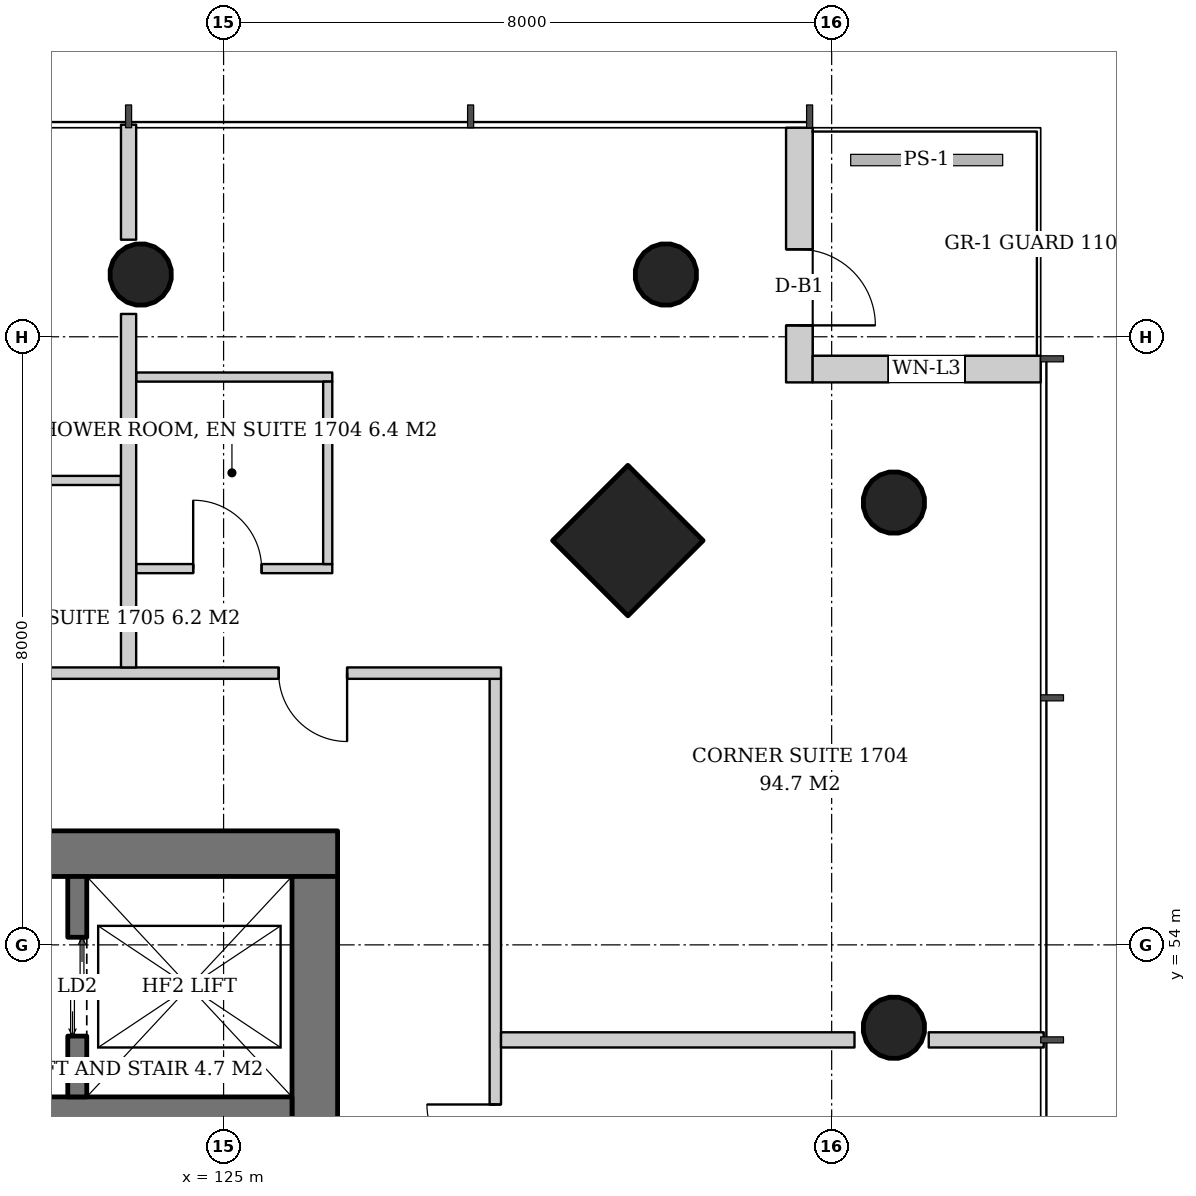
"""IFC4 building model, lengths in metres.
Left out: names, types, materials, properties, quantities, classifications, styles, units other than length and angle.
Written with IfcOpenShell. Run it as: python <this file> out.ifc"""

import sys

from ifc_helpers import new_model, si_unit, direction, frame, frame_2d, origin, origin_2d, place, context, subcontext, project, spatial, rectangle, hollow_circle, extrude, element, fill, save


model = new_model("IFC4")
c1 = context("Model", 3, precision=1e-05, world=origin(), true_north=direction((0.0, 1.0)))
c2 = subcontext(c1, "Body", "Model", "MODEL_VIEW")
j1 = project(units=[si_unit("LENGTHUNIT", "METRE"), si_unit("PLANEANGLEUNIT", "RADIAN")], contexts=[c1])
p1 = place(None, origin())
s1 = spatial("IfcSite", under=j1, at=p1, CompositionType="ELEMENT")
p2 = place(p1, origin())
s2 = spatial("IfcBuilding", under=s1, at=p2, CompositionType="ELEMENT")
p3 = place(p2, frame((0.0, 0.0, 70.4)))
s3 = spatial("IfcBuildingStorey", under=s2, at=p3, CompositionType="ELEMENT", Elevation=70.4)
p4 = place(p3, frame((130.371, 59.371, 0.0), z_axis=(-0.043029647111, -0.043029647111, 0.998146732169), x_axis=(0.707106781187, -0.707106781187, 0.0)))
e1 = element("IfcColumn", 1, at=p4, inside=s3, PredefinedType="COLUMN", context=c2, shape_type="SweptSolid", body=[
    extrude(rectangle(XDim=1.4, YDim=1.4, at=origin_2d()), origin(), (0.0, 0.0, 1.0), 3.807),
])
p5 = place(p3, frame((133.871, 59.871, 0.0), z_axis=(-0.043029647111, -0.043029647111, 0.998146732169), x_axis=(0.707106781187, -0.707106781187, 0.0)))
e2 = element("IfcColumn", 2, at=p5, inside=s3, PredefinedType="COLUMN", context=c2, shape_type="SweptSolid", body=[
    extrude(hollow_circle(Radius=0.406, WallThickness=0.03, at=origin_2d()), origin(), (0.0, 0.0, 1.0), 3.807),
])
p6 = place(p3, frame((133.871, 52.935, 0.0), z_axis=(-0.043059584825, -0.021497706284, 0.998841188968), x_axis=(0.446680166538, -0.894693706707, 0.0)))
e3 = element("IfcColumn", 3, at=p6, inside=s3, PredefinedType="COLUMN", context=c2, shape_type="SweptSolid", body=[
    extrude(hollow_circle(Radius=0.406, WallThickness=0.03, at=origin_2d()), origin(), (0.0, 0.0, 1.0), 3.804),
])
p7 = place(p3, frame((130.871, 62.871, 0.0), z_axis=(-0.043029647111, -0.043029647111, 0.998146732169), x_axis=(0.707106781187, -0.707106781187, 0.0)))
e4 = element("IfcColumn", 4, at=p7, inside=s3, PredefinedType="COLUMN", context=c2, shape_type="SweptSolid", body=[
    extrude(hollow_circle(Radius=0.406, WallThickness=0.03, at=origin_2d()), origin(), (0.0, 0.0, 1.0), 3.807),
])
p8 = place(p3, frame((123.935, 62.871, 0.0), z_axis=(-0.021497706284, -0.043059584825, 0.998841188968), x_axis=(0.894693706707, -0.446680166538, 0.0)))
e5 = element("IfcColumn", 5, at=p8, inside=s3, PredefinedType="COLUMN", context=c2, shape_type="SweptSolid", body=[
    extrude(hollow_circle(Radius=0.406, WallThickness=0.03, at=origin_2d()), origin(), (0.0, 0.0, 1.0), 3.804),
])
p9 = place(p3, frame((107.5, 55.2, 0.0), z_axis=(0.0, 0.0, 1.0), x_axis=(1.0, 0.0, 0.0)))
e6 = element("IfcWall", 6, at=p9, inside=s3, PredefinedType="SHEAR", context=c2, shape_type="SweptSolid", body=[
    extrude(rectangle(XDim=19.0, YDim=0.6, at=frame_2d((9.5, 0.0))), origin(), (0.0, 0.0, 1.0), 3.8),
])
p10 = place(p9, frame((14.14, 0.0, 0.0)))
e7 = element("IfcOpeningElement", 7, at=p10, cuts=e6, PredefinedType="OPENING", context=c2, shape_type="SweptSolid", body=[
    extrude(rectangle(XDim=1.0, YDim=2.1, at=frame_2d((0.5, 1.05))), frame((0.0, 0.31, 0.0), z_axis=(0.0, -1.0, 0.0), x_axis=(1.0, 0.0, 0.0)), (0.0, 0.0, 1.0), 0.62),
])
p11 = place(p9, frame((1.024, 0.0, 0.0)))
e8 = element("IfcOpeningElement", 8, at=p11, cuts=e6, PredefinedType="OPENING", context=c2, shape_type="SweptSolid", body=[
    extrude(rectangle(XDim=1.0, YDim=2.1, at=frame_2d((0.5, 1.05))), frame((0.0, 0.31, 0.0), z_axis=(0.0, -1.0, 0.0), x_axis=(1.0, 0.0, 0.0)), (0.0, 0.0, 1.0), 0.62),
])
p12 = place(p9, frame((3.262, 0.0, 0.0)))
e9 = element("IfcOpeningElement", 9, at=p12, cuts=e6, PredefinedType="OPENING", context=c2, shape_type="SweptSolid", body=[
    extrude(rectangle(XDim=1.0, YDim=2.1, at=frame_2d((0.5, 1.05))), frame((0.0, 0.31, 0.0), z_axis=(0.0, -1.0, 0.0), x_axis=(1.0, 0.0, 0.0)), (0.0, 0.0, 1.0), 0.62),
])
p13 = place(p3, frame((126.2, 37.1, 0.0), z_axis=(0.0, 0.0, 1.0), x_axis=(0.0, 1.0, 0.0)))
e10 = element("IfcWall", 10, at=p13, inside=s3, PredefinedType="SHEAR", context=c2, shape_type="SweptSolid", body=[
    extrude(rectangle(XDim=17.8, YDim=0.6, at=frame_2d((8.9, 0.0))), origin(), (0.0, 0.0, 1.0), 3.8),
])
p14 = place(p13, frame((8.0, 0.0, 0.0)))
e11 = element("IfcOpeningElement", 11, at=p14, cuts=e10, PredefinedType="OPENING", context=c2, shape_type="SweptSolid", body=[
    extrude(rectangle(XDim=1.8, YDim=2.4, at=frame_2d((0.9, 1.2))), frame((0.0, 0.31, 0.0), z_axis=(0.0, -1.0, 0.0), x_axis=(1.0, 0.0, 0.0)), (0.0, 0.0, 1.0), 0.62),
])
p15 = place(p3, frame((108.1, 51.8, 0.0), z_axis=(0.0, 0.0, 1.0), x_axis=(1.0, 0.0, 0.0)))
e12 = element("IfcWall", 12, at=p15, inside=s3, PredefinedType="SHEAR", context=c2, shape_type="SweptSolid", body=[
    extrude(rectangle(XDim=17.8, YDim=0.4, at=frame_2d((8.9, 0.0))), origin(), (0.0, 0.0, 1.0), 3.8),
])
p16 = place(p3, frame((132.575, 64.75, 0.0), z_axis=(0.0, 0.0, 1.0), x_axis=(0.0, -1.0, 0.0)))
e13 = element("IfcWall", 13, at=p16, inside=s3, PredefinedType="SOLIDWALL", context=c2, shape_type="SweptSolid", body=[
    extrude(rectangle(XDim=3.35, YDim=0.35, at=frame_2d((1.675, 0.0))), origin(), (0.0, 0.0, 1.0), 3.6),
])
p17 = place(p16, frame((1.6, 0.0, 0.0)))
e14 = element("IfcOpeningElement", 14, at=p17, cuts=e13, PredefinedType="OPENING", context=c2, shape_type="SweptSolid", body=[
    extrude(rectangle(XDim=1.0, YDim=2.4, at=frame_2d((0.5, 1.2))), frame((0.0, 0.185, 0.0), z_axis=(0.0, -1.0, 0.0), x_axis=(1.0, 0.0, 0.0)), (0.0, 0.0, 1.0), 0.37),
])
p18 = place(p3, frame((132.75, 61.575, 0.0), z_axis=(0.0, 0.0, 1.0), x_axis=(1.0, 0.0, 0.0)))
e15 = element("IfcWall", 15, at=p18, inside=s3, PredefinedType="SOLIDWALL", context=c2, shape_type="SweptSolid", body=[
    extrude(rectangle(XDim=3.0, YDim=0.35, at=frame_2d((1.5, 0.0))), origin(), (0.0, 0.0, 1.0), 3.6),
])
p19 = place(p18, frame((1.0, 0.0, 0.9)))
e16 = element("IfcOpeningElement", 16, at=p19, cuts=e15, PredefinedType="OPENING", context=c2, shape_type="SweptSolid", body=[
    extrude(rectangle(XDim=1.0, YDim=2.4, at=frame_2d((0.5, 1.2))), frame((0.0, 0.185, 0.0), z_axis=(0.0, -1.0, 0.0), x_axis=(1.0, 0.0, 0.0)), (0.0, 0.0, 1.0), 0.37),
])
p20 = place(p3, frame((123.075, 52.0, 0.0), z_axis=(0.0, 0.0, 1.0), x_axis=(0.0, 1.0, 0.0)))
e17 = element("IfcWall", 17, at=p20, inside=s3, PredefinedType="SHEAR", context=c2, shape_type="SweptSolid", body=[
    extrude(rectangle(XDim=2.9, YDim=0.25, at=frame_2d((1.45, 0.0))), origin(), (0.0, 0.0, 1.0), 3.8),
])
p21 = place(p20, frame((0.8, 0.0, 0.0)))
e18 = element("IfcOpeningElement", 18, at=p21, cuts=e17, PredefinedType="OPENING", context=c2, shape_type="SweptSolid", body=[
    extrude(rectangle(XDim=1.3, YDim=2.2, at=frame_2d((0.65, 1.1))), frame((0.0, 0.135, 0.0), z_axis=(0.0, -1.0, 0.0), x_axis=(1.0, 0.0, 0.0)), (0.0, 0.0, 1.0), 0.27),
])
p22 = place(p3, frame((128.575, 34.35, 0.0), z_axis=(0.0, 0.0, 1.0), x_axis=(0.0, 1.0, 0.0)))
e19 = element("IfcWall", 19, at=p22, inside=s3, PredefinedType="PARTITIONING", context=c2, shape_type="SweptSolid", body=[
    extrude(rectangle(XDim=23.15, YDim=0.15, at=frame_2d((11.575, 0.0))), origin(), (0.0, 0.0, 1.0), 2.8),
])
p23 = place(p22, frame((2.025, 0.0, 0.0)))
e20 = element("IfcOpeningElement", 20, at=p23, cuts=e19, PredefinedType="OPENING", context=c2, shape_type="SweptSolid", body=[
    extrude(rectangle(XDim=0.9, YDim=2.1, at=frame_2d((0.45, 1.05))), frame((0.0, 0.085, 0.0), z_axis=(0.0, -1.0, 0.0), x_axis=(1.0, 0.0, 0.0)), (0.0, 0.0, 1.0), 0.17),
])
p24 = place(p22, frame((10.25, 0.0, 0.0)))
e21 = element("IfcOpeningElement", 21, at=p24, cuts=e19, PredefinedType="OPENING", context=c2, shape_type="SweptSolid", body=[
    extrude(rectangle(XDim=0.9, YDim=2.1, at=frame_2d((0.45, 1.05))), frame((0.0, 0.085, 0.0), z_axis=(0.0, -1.0, 0.0), x_axis=(1.0, 0.0, 0.0)), (0.0, 0.0, 1.0), 0.17),
])
p25 = place(p22, frame((16.65, 0.0, 0.0)))
e22 = element("IfcOpeningElement", 22, at=p25, cuts=e19, PredefinedType="OPENING", context=c2, shape_type="SweptSolid", body=[
    extrude(rectangle(XDim=0.9, YDim=2.1, at=frame_2d((0.45, 1.05))), frame((0.0, 0.085, 0.0), z_axis=(0.0, -1.0, 0.0), x_axis=(1.0, 0.0, 0.0)), (0.0, 0.0, 1.0), 0.17),
])
p26 = place(p3, frame((128.65, 52.75, 0.0), z_axis=(0.0, 0.0, 1.0), x_axis=(1.0, 0.0, 0.0)))
e23 = element("IfcWall", 23, at=p26, inside=s3, PredefinedType="PARTITIONING", context=c2, shape_type="SweptSolid", body=[
    extrude(rectangle(XDim=4.65, YDim=0.2, at=frame_2d((2.325, 0.0))), origin(), (0.0, 0.0, 1.0), 3.6),
])
p27 = place(p3, frame((134.277, 52.75, 0.0), z_axis=(0.0, 0.0, 1.0), x_axis=(1.0, 0.0, 0.0)))
e24 = element("IfcWall", 24, at=p27, inside=s3, PredefinedType="PARTITIONING", context=c2, shape_type="SweptSolid", body=[
    extrude(rectangle(XDim=1.513, YDim=0.2, at=frame_2d((0.756, 0.0))), origin(), (0.0, 0.0, 1.0), 3.6),
])
p28 = place(p3, frame((123.85, 58.95, 0.0), z_axis=(0.0, 0.0, 1.0), x_axis=(1.0, 0.0, 0.0)))
e25 = element("IfcWall", 25, at=p28, inside=s3, PredefinedType="PARTITIONING", context=c2, shape_type="SweptSolid", body=[
    extrude(rectangle(XDim=2.58, YDim=0.12, at=frame_2d((1.29, 0.0))), origin(), (0.0, 0.0, 1.0), 2.8),
])
p29 = place(p28, frame((0.75, 0.0, 0.0)))
e26 = element("IfcOpeningElement", 26, at=p29, cuts=e25, PredefinedType="OPENING", context=c2, shape_type="SweptSolid", body=[
    extrude(rectangle(XDim=0.9, YDim=2.1, at=frame_2d((0.45, 1.05))), frame((0.0, 0.07, 0.0), z_axis=(0.0, -1.0, 0.0), x_axis=(1.0, 0.0, 0.0)), (0.0, 0.0, 1.0), 0.14),
])
p30 = place(p3, frame((123.85, 61.47, 0.0), z_axis=(0.0, 0.0, 1.0), x_axis=(1.0, 0.0, 0.0)))
e27 = element("IfcWall", 27, at=p30, inside=s3, PredefinedType="PARTITIONING", context=c2, shape_type="SweptSolid", body=[
    extrude(rectangle(XDim=2.58, YDim=0.12, at=frame_2d((1.29, 0.0))), origin(), (0.0, 0.0, 1.0), 2.8),
])
p31 = place(p3, frame((126.37, 59.01, 0.0), z_axis=(0.0, 0.0, 1.0), x_axis=(0.0, 1.0, 0.0)))
e28 = element("IfcWall", 28, at=p31, inside=s3, PredefinedType="PARTITIONING", context=c2, shape_type="SweptSolid", body=[
    extrude(rectangle(XDim=2.4, YDim=0.12, at=frame_2d((1.2, 0.0))), origin(), (0.0, 0.0, 1.0), 2.8),
])
p32 = place(p3, frame((123.65, 60.11, 0.0), z_axis=(0.0, 0.0, 1.0), x_axis=(-1.0, 0.0, 0.0)))
e29 = element("IfcWall", 29, at=p32, inside=s3, PredefinedType="PARTITIONING", context=c2, shape_type="SweptSolid", body=[
    extrude(rectangle(XDim=2.42, YDim=0.12, at=frame_2d((1.21, 0.0))), origin(), (0.0, 0.0, 1.0), 2.847),
])
p33 = place(p3, frame((128.65, 57.575, 0.0), z_axis=(0.0, 0.0, 1.0), x_axis=(-1.0, 0.0, 0.0)))
e30 = element("IfcWall", 30, at=p33, inside=s3, PredefinedType="PARTITIONING", context=c2, shape_type="SweptSolid", body=[
    extrude(rectangle(XDim=23.15, YDim=0.15, at=frame_2d((11.575, 0.0))), origin(), (0.0, 0.0, 1.0), 2.8),
])
p34 = place(p33, frame((2.025, 0.0, 0.0)))
e31 = element("IfcOpeningElement", 31, at=p34, cuts=e30, PredefinedType="OPENING", context=c2, shape_type="SweptSolid", body=[
    extrude(rectangle(XDim=0.9, YDim=2.1, at=frame_2d((0.45, 1.05))), frame((0.0, 0.085, 0.0), z_axis=(0.0, -1.0, 0.0), x_axis=(1.0, 0.0, 0.0)), (0.0, 0.0, 1.0), 0.17),
])
p35 = place(p33, frame((7.65, 0.0, 0.0)))
e32 = element("IfcOpeningElement", 32, at=p35, cuts=e30, PredefinedType="OPENING", context=c2, shape_type="SweptSolid", body=[
    extrude(rectangle(XDim=0.9, YDim=2.1, at=frame_2d((0.45, 1.05))), frame((0.0, 0.085, 0.0), z_axis=(0.0, -1.0, 0.0), x_axis=(1.0, 0.0, 0.0)), (0.0, 0.0, 1.0), 0.17),
])
p36 = place(p33, frame((14.75, 0.0, 0.0)))
e33 = element("IfcOpeningElement", 33, at=p36, cuts=e30, PredefinedType="OPENING", context=c2, shape_type="SweptSolid", body=[
    extrude(rectangle(XDim=0.9, YDim=2.1, at=frame_2d((0.45, 1.05))), frame((0.0, 0.085, 0.0), z_axis=(0.0, -1.0, 0.0), x_axis=(1.0, 0.0, 0.0)), (0.0, 0.0, 1.0), 0.17),
])
p37 = place(p3, frame((123.75, 57.65, 0.0), z_axis=(0.0, 0.0, 1.0), x_axis=(0.0, 1.0, 0.0)))
e34 = element("IfcWall", 34, at=p37, inside=s3, PredefinedType="PARTITIONING", context=c2, shape_type="SweptSolid", body=[
    extrude(rectangle(XDim=4.65, YDim=0.2, at=frame_2d((2.325, 0.0))), origin(), (0.0, 0.0, 1.0), 3.6),
])
p38 = place(p3, frame((123.75, 63.277, 0.0), z_axis=(0.0, 0.0, 1.0), x_axis=(0.0, 1.0, 0.0)))
e35 = element("IfcWall", 35, at=p38, inside=s3, PredefinedType="PARTITIONING", context=c2, shape_type="SweptSolid", body=[
    extrude(rectangle(XDim=1.513, YDim=0.2, at=frame_2d((0.756, 0.0))), origin(), (0.0, 0.0, 1.0), 3.6),
])
p39 = place(p17, origin())
e36 = element("IfcDoor", 36, at=p39, inside=s3, OperationType="SINGLE_SWING_RIGHT", PredefinedType="DOOR", context=c2, shape_type="SweptSolid", body=[
    extrude(rectangle(XDim=1.0, YDim=2.4, at=frame_2d((0.5, 1.2))), frame((0.0, 0.025, 0.0), z_axis=(0.0, -1.0, 0.0), x_axis=(1.0, 0.0, 0.0)), (0.0, 0.0, 1.0), 0.05),
])
fill(e14, e36)
p40 = place(p19, origin())
e37 = element("IfcWindow", 37, at=p40, inside=s3, PartitioningType="SINGLE_PANEL", PredefinedType="WINDOW", context=c2, shape_type="SweptSolid", body=[
    extrude(rectangle(XDim=1.0, YDim=2.4, at=frame_2d((0.5, 1.2))), frame((0.0, 0.03, 0.0), z_axis=(0.0, -1.0, 0.0), x_axis=(1.0, 0.0, 0.0)), (0.0, 0.0, 1.0), 0.06),
])
fill(e16, e37)
p41 = place(p21, origin())
e38 = element("IfcDoor", 38, at=p41, inside=s3, OperationType="DOUBLE_DOOR_SLIDING", PredefinedType="DOOR", context=c2, shape_type="SweptSolid", body=[
    extrude(rectangle(XDim=1.3, YDim=2.2, at=frame_2d((0.65, 1.1))), frame((0.0, 0.025, 0.0), z_axis=(0.0, -1.0, 0.0), x_axis=(1.0, 0.0, 0.0)), (0.0, 0.0, 1.0), 0.05),
])
fill(e18, e38)
p42 = place(p25, origin())
e39 = element("IfcDoor", 39, at=p42, inside=s3, OperationType="SINGLE_SWING_RIGHT", PredefinedType="DOOR", context=c2, shape_type="SweptSolid", body=[
    extrude(rectangle(XDim=0.9, YDim=2.1, at=frame_2d((0.45, 1.05))), frame((0.0, 0.025, 0.0), z_axis=(0.0, -1.0, 0.0), x_axis=(1.0, 0.0, 0.0)), (0.0, 0.0, 1.0), 0.05),
])
fill(e22, e39)
p43 = place(p29, origin())
e40 = element("IfcDoor", 40, at=p43, inside=s3, OperationType="SINGLE_SWING_LEFT", PredefinedType="DOOR", context=c2, shape_type="SweptSolid", body=[
    extrude(rectangle(XDim=0.9, YDim=2.1, at=frame_2d((0.45, 1.05))), frame((0.0, 0.025, 0.0), z_axis=(0.0, -1.0, 0.0), x_axis=(1.0, 0.0, 0.0)), (0.0, 0.0, 1.0), 0.05),
])
fill(e26, e40)
p44 = place(p34, origin())
e41 = element("IfcDoor", 41, at=p44, inside=s3, OperationType="SINGLE_SWING_LEFT", PredefinedType="DOOR", context=c2, shape_type="SweptSolid", body=[
    extrude(rectangle(XDim=0.9, YDim=2.1, at=frame_2d((0.45, 1.05))), frame((0.0, 0.025, 0.0), z_axis=(0.0, -1.0, 0.0), x_axis=(1.0, 0.0, 0.0)), (0.0, 0.0, 1.0), 0.05),
])
fill(e31, e41)
save(model, sys.argv[1])
